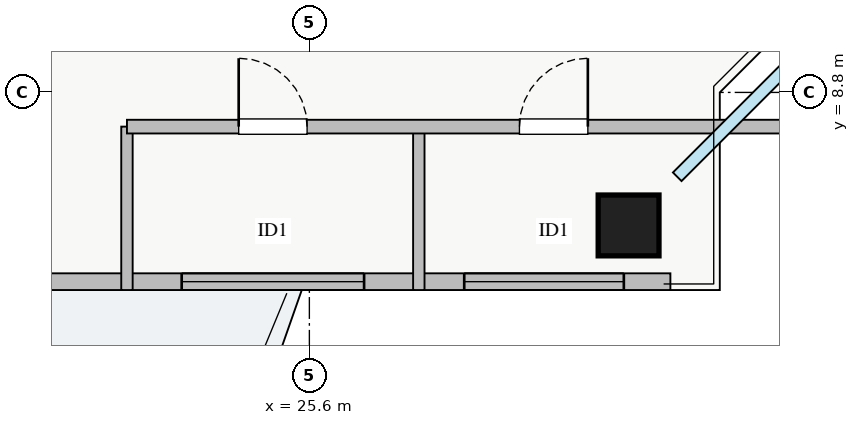
"""IFC4 building model, lengths in metres.
Left out: names, types, materials, properties, quantities, classifications, styles, units other than length and angle.
Written with IfcOpenShell. Run it as: python <this file> out.ifc"""

import sys

from ifc_helpers import new_model, si_unit, direction, frame, frame_2d, origin, origin_2d, place, context, subcontext, project, spatial, rectangle, extrude, source, transform, mapped, element, fill, save


model = new_model("IFC4")
c1 = context("Model", 3, precision=1e-05, world=origin(), true_north=direction((0.0, 1.0)))
c2 = subcontext(c1, "Body", "Model", "MODEL_VIEW")
j1 = project(units=[si_unit("LENGTHUNIT", "METRE"), si_unit("PLANEANGLEUNIT", "RADIAN")], contexts=[c1])
p1 = place(None, origin())
s1 = spatial("IfcSite", under=j1, at=p1, CompositionType="ELEMENT")
p2 = place(p1, origin())
s2 = spatial("IfcBuilding", under=s1, at=p2, CompositionType="ELEMENT")
p3 = place(p2, frame((0.0, 0.0, 210.0)))
s3 = spatial("IfcBuildingStorey", under=s2, at=p3, CompositionType="ELEMENT", Elevation=210.0)
m1 = source(origin(), c2, "Body", "SweptSolid", [
    extrude(rectangle(XDim=0.8, YDim=0.8, at=origin_2d()), origin(), (0.0, 0.0, 1.0), 3.25),
])
p4 = place(p3, frame((29.8, 7.05, 0.0), z_axis=(0.0, 0.0, 1.0), x_axis=(1.0, 0.0, 0.0)))
e1 = element("IfcColumn", 1, at=p4, inside=s3, PredefinedType="COLUMN", context=c2, shape_type="MappedRepresentation", body=[
    mapped(m1, transform((0.0, 0.0, 0.0), x_axis=(1.0, 0.0, 0.0), y_axis=(0.0, 1.0, 0.0), z_axis=(0.0, 0.0, 1.0), scale=1.0)),
])
p5 = place(p3, frame((7.65, 6.31, 0.0), z_axis=(0.0, 0.0, 1.0), x_axis=(1.0, 0.0, 0.0)))
e2 = element("IfcWall", 2, at=p5, inside=s3, PredefinedType="STANDARD", context=c2, shape_type="SweptSolid", body=[
    extrude(rectangle(XDim=22.7, YDim=0.22, at=frame_2d((11.35, 0.0))), origin(), (0.0, 0.0, 1.0), 2.61),
])
p6 = place(p5, frame((12.2, 0.0, 0.0)))
e3 = element("IfcOpeningElement", 3, at=p6, cuts=e2, PredefinedType="OPENING", context=c2, shape_type="SweptSolid", body=[
    extrude(rectangle(XDim=1.2, YDim=2.1, at=frame_2d((0.6, 1.05))), frame((0.0, 0.12, 0.0), z_axis=(0.0, -1.0, 0.0), x_axis=(1.0, 0.0, 0.0)), (0.0, 0.0, 1.0), 0.24),
])
p7 = place(p5, frame((1.637, 0.0, 0.9)))
e4 = element("IfcOpeningElement", 4, at=p7, cuts=e2, PredefinedType="OPENING", context=c2, shape_type="SweptSolid", body=[
    extrude(rectangle(XDim=2.4, YDim=1.48, at=frame_2d((1.2, 0.74))), frame((0.0, 0.12, 0.0), z_axis=(0.0, -1.0, 0.0), x_axis=(1.0, 0.0, 0.0)), (0.0, 0.0, 1.0), 0.24),
])
p8 = place(p5, frame((7.612, 0.0, 0.9)))
e5 = element("IfcOpeningElement", 5, at=p8, cuts=e2, PredefinedType="OPENING", context=c2, shape_type="SweptSolid", body=[
    extrude(rectangle(XDim=1.8, YDim=1.45, at=frame_2d((0.9, 0.725))), frame((0.0, 0.12, 0.0), z_axis=(0.0, -1.0, 0.0), x_axis=(1.0, 0.0, 0.0)), (0.0, 0.0, 1.0), 0.24),
])
p9 = place(p5, frame((19.988, 0.0, 0.9)))
e6 = element("IfcOpeningElement", 6, at=p9, cuts=e2, PredefinedType="OPENING", context=c2, shape_type="SweptSolid", body=[
    extrude(rectangle(XDim=2.1, YDim=1.5, at=frame_2d((1.05, 0.75))), frame((0.0, 0.12, 0.0), z_axis=(0.0, -1.0, 0.0), x_axis=(1.0, 0.0, 0.0)), (0.0, 0.0, 1.0), 0.24),
])
p10 = place(p5, frame((16.27, 0.0, 0.9)))
e7 = element("IfcOpeningElement", 7, at=p10, cuts=e2, PredefinedType="OPENING", context=c2, shape_type="SweptSolid", body=[
    extrude(rectangle(XDim=2.4, YDim=1.5, at=frame_2d((1.2, 0.75))), frame((0.0, 0.12, 0.0), z_axis=(0.0, -1.0, 0.0), x_axis=(1.0, 0.0, 0.0)), (0.0, 0.0, 1.0), 0.24),
])
for number, where, z_axis, x_axis in (
    (8, (23.2, 6.2, 0.0), (0.0, 0.0, 1.0), (0.0, 1.0, 0.0)),
    (9, (27.04, 6.2, 0.0), (0.0, 0.0, 1.0), (0.0, 1.0, 0.0)),
):
    element("IfcWall", number, at=place(p3, frame(where, z_axis=z_axis, x_axis=x_axis)), inside=s3, PredefinedType="PARTITIONING", context=c2, shape_type="SweptSolid", body=[
        extrude(rectangle(XDim=2.15, YDim=0.15, at=frame_2d((1.075, 0.0))), origin(), (0.0, 0.0, 1.0), 3.07),
    ])
p11 = place(p3, frame((23.2, 8.35, 0.0), z_axis=(0.0, 0.0, 1.0), x_axis=(1.0, 0.0, 0.0)))
e10 = element("IfcWall", 10, at=p11, inside=s3, PredefinedType="PARTITIONING", context=c2, shape_type="SweptSolid", body=[
    extrude(rectangle(XDim=9.25, YDim=0.18, at=frame_2d((4.625, 0.0))), origin(), (0.0, 0.0, 1.0), 3.07),
])
p12 = place(p11, frame((1.47, 0.0, 0.0)))
e11 = element("IfcOpeningElement", 11, at=p12, cuts=e10, PredefinedType="OPENING", context=c2, shape_type="SweptSolid", body=[
    extrude(rectangle(XDim=0.9, YDim=2.05, at=frame_2d((0.45, 1.025))), frame((0.0, 0.1, 0.0), z_axis=(0.0, -1.0, 0.0), x_axis=(1.0, 0.0, 0.0)), (0.0, 0.0, 1.0), 0.2),
])
p13 = place(p11, frame((5.164, 0.0, 0.0)))
e12 = element("IfcOpeningElement", 12, at=p13, cuts=e10, PredefinedType="OPENING", context=c2, shape_type="SweptSolid", body=[
    extrude(rectangle(XDim=0.9, YDim=2.05, at=frame_2d((0.45, 1.025))), frame((0.0, 0.1, 0.0), z_axis=(0.0, -1.0, 0.0), x_axis=(1.0, 0.0, 0.0)), (0.0, 0.0, 1.0), 0.2),
])
m2 = source(origin(), c2, "Body", "SweptSolid", [
    extrude(rectangle(XDim=2.1, YDim=1.5, at=frame_2d((1.05, 0.75))), frame((0.0, 0.03, 0.0), z_axis=(0.0, -1.0, 0.0), x_axis=(1.0, 0.0, 0.0)), (0.0, 0.0, 1.0), 0.06),
])
p14 = place(p9, origin())
e13 = element("IfcWindow", 13, at=p14, inside=s3, PartitioningType="TRIPLE_PANEL_VERTICAL", PredefinedType="WINDOW", context=c2, shape_type="MappedRepresentation", body=[
    mapped(m2, transform((0.0, 0.0, 0.0), x_axis=(1.0, 0.0, 0.0), y_axis=(0.0, 1.0, 0.0), z_axis=(0.0, 0.0, 1.0), scale=1.0)),
])
fill(e6, e13)
m3 = source(origin(), c2, "Body", "SweptSolid", [
    extrude(rectangle(XDim=0.9, YDim=2.05, at=frame_2d((0.45, 1.025))), frame((0.0, 0.025, 0.0), z_axis=(0.0, -1.0, 0.0), x_axis=(1.0, 0.0, 0.0)), (0.0, 0.0, 1.0), 0.05),
])
p15 = place(p12, origin())
e14 = element("IfcDoor", 14, at=p15, inside=s3, OperationType="SINGLE_SWING_LEFT", PredefinedType="DOOR", context=c2, shape_type="MappedRepresentation", body=[
    mapped(m3, transform((0.0, 0.0, 0.0), x_axis=(1.0, 0.0, 0.0), y_axis=(0.0, 1.0, 0.0), z_axis=(0.0, 0.0, 1.0), scale=1.0)),
])
fill(e11, e14)
p16 = place(p13, origin())
e15 = element("IfcDoor", 15, at=p16, inside=s3, OperationType="SINGLE_SWING_RIGHT", PredefinedType="DOOR", context=c2, shape_type="MappedRepresentation", body=[
    mapped(m3, transform((0.0, 0.0, 0.0), x_axis=(1.0, 0.0, 0.0), y_axis=(0.0, 1.0, 0.0), z_axis=(0.0, 0.0, 1.0), scale=1.0)),
])
fill(e12, e15)
m4 = source(origin(), c2, "Body", "SweptSolid", [
    extrude(rectangle(XDim=2.4, YDim=1.5, at=frame_2d((1.2, 0.75))), frame((0.0, 0.03, 0.0), z_axis=(0.0, -1.0, 0.0), x_axis=(1.0, 0.0, 0.0)), (0.0, 0.0, 1.0), 0.06),
])
p17 = place(p10, origin())
e16 = element("IfcWindow", 16, at=p17, inside=s3, PartitioningType="TRIPLE_PANEL_VERTICAL", PredefinedType="WINDOW", context=c2, shape_type="MappedRepresentation", body=[
    mapped(m4, transform((0.0, 0.0, 0.0), x_axis=(1.0, 0.0, 0.0), y_axis=(0.0, 1.0, 0.0), z_axis=(0.0, 0.0, 1.0), scale=1.0)),
])
fill(e7, e16)
save(model, sys.argv[1])
